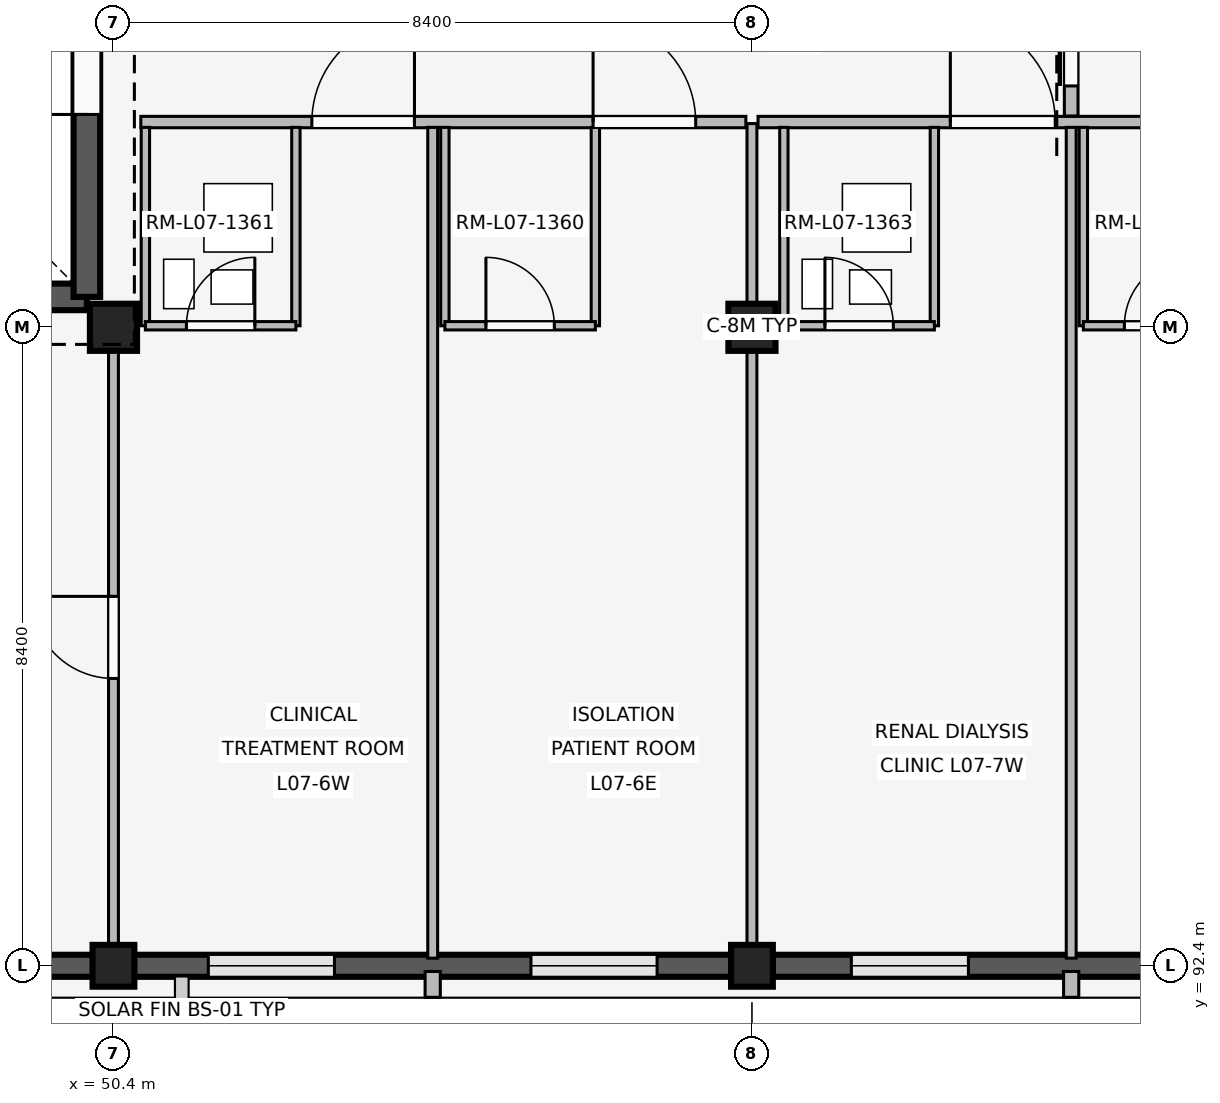
"""IFC4 building model, lengths in metres.
Left out: names, types, materials, properties, quantities, classifications, styles, units other than length and angle.
Written with IfcOpenShell. Run it as: python <this file> out.ifc"""

import sys

from ifc_helpers import new_model, si_unit, direction, frame, frame_2d, origin, origin_2d, place, context, subcontext, project, spatial, rectangle, extrude, element, fill, save


model = new_model("IFC4")
c1 = context("Model", 3, precision=1e-05, world=origin(), true_north=direction((0.0, 1.0)))
c2 = subcontext(c1, "Body", "Model", "MODEL_VIEW")
j1 = project(units=[si_unit("LENGTHUNIT", "METRE"), si_unit("PLANEANGLEUNIT", "RADIAN")], contexts=[c1])
p1 = place(None, origin())
s1 = spatial("IfcSite", under=j1, at=p1, CompositionType="ELEMENT")
p2 = place(p1, origin())
s2 = spatial("IfcBuilding", under=s1, at=p2, CompositionType="ELEMENT")
p3 = place(p2, frame((0.0, 0.0, 28.8)))
s3 = spatial("IfcBuildingStorey", under=s2, at=p3, CompositionType="ELEMENT", Elevation=28.8)
p4 = place(p3, frame((50.4, 92.4, 0.0), z_axis=(0.0, 0.0, 1.0), x_axis=(1.0, 0.0, 0.0)))
e1 = element("IfcColumn", 1, at=p4, inside=s3, PredefinedType="COLUMN", context=c2, shape_type="SweptSolid", body=[
    extrude(rectangle(XDim=0.55, YDim=0.55, at=origin_2d()), origin(), (0.0, 0.0, 1.0), 4.2),
])
p5 = place(p3, frame((50.4, 100.8, 0.0), z_axis=(0.0, 0.0, 1.0), x_axis=(1.0, 0.0, 0.0)))
e2 = element("IfcColumn", 2, at=p5, inside=s3, PredefinedType="COLUMN", context=c2, shape_type="SweptSolid", body=[
    extrude(rectangle(XDim=0.62, YDim=0.62, at=origin_2d()), origin(), (0.0, 0.0, 1.0), 4.2),
])
p6 = place(p3, frame((58.8, 92.4, 0.0), z_axis=(0.0, 0.0, 1.0), x_axis=(1.0, 0.0, 0.0)))
e3 = element("IfcColumn", 3, at=p6, inside=s3, PredefinedType="COLUMN", context=c2, shape_type="SweptSolid", body=[
    extrude(rectangle(XDim=0.55, YDim=0.55, at=origin_2d()), origin(), (0.0, 0.0, 1.0), 4.2),
])
p7 = place(p3, frame((58.8, 100.8, 0.0), z_axis=(0.0, 0.0, 1.0), x_axis=(1.0, 0.0, 0.0)))
e4 = element("IfcColumn", 4, at=p7, inside=s3, PredefinedType="COLUMN", context=c2, shape_type="SweptSolid", body=[
    extrude(rectangle(XDim=0.62, YDim=0.62, at=origin_2d()), origin(), (0.0, 0.0, 1.0), 4.2),
])
p8 = place(p3, frame((50.13, 92.4, 0.0), z_axis=(0.0, 0.0, 1.0), x_axis=(-1.0, 0.0, 0.0)))
e5 = element("IfcWall", 5, at=p8, inside=s3, PredefinedType="SOLIDWALL", context=c2, shape_type="SweptSolid", body=[
    extrude(rectangle(XDim=7.86, YDim=0.29, at=frame_2d((3.93, 0.0))), origin(), (0.0, 0.0, 1.0), 3.34),
])
p9 = place(p8, frame((1.098, 0.0, 0.85)))
e6 = element("IfcOpeningElement", 6, at=p9, cuts=e5, PredefinedType="OPENING", context=c2, shape_type="SweptSolid", body=[
    extrude(rectangle(XDim=1.42, YDim=1.45, at=frame_2d((0.71, 0.725))), frame((0.0, 0.155, 0.0), z_axis=(0.0, -1.0, 0.0), x_axis=(1.0, 0.0, 0.0)), (0.0, 0.0, 1.0), 0.31),
])
p10 = place(p8, frame((5.342, 0.0, 0.85)))
e7 = element("IfcOpeningElement", 7, at=p10, cuts=e5, PredefinedType="OPENING", context=c2, shape_type="SweptSolid", body=[
    extrude(rectangle(XDim=1.42, YDim=1.45, at=frame_2d((0.71, 0.725))), frame((0.0, 0.155, 0.0), z_axis=(0.0, -1.0, 0.0), x_axis=(1.0, 0.0, 0.0)), (0.0, 0.0, 1.0), 0.31),
])
p11 = place(p3, frame((58.53, 92.4, 0.0), z_axis=(0.0, 0.0, 1.0), x_axis=(-1.0, 0.0, 0.0)))
e8 = element("IfcWall", 8, at=p11, inside=s3, PredefinedType="SOLIDWALL", context=c2, shape_type="SweptSolid", body=[
    extrude(rectangle(XDim=7.86, YDim=0.29, at=frame_2d((3.93, 0.0))), origin(), (0.0, 0.0, 1.0), 3.34),
])
p12 = place(p11, frame((0.978, 0.0, 0.85)))
e9 = element("IfcOpeningElement", 9, at=p12, cuts=e8, PredefinedType="OPENING", context=c2, shape_type="SweptSolid", body=[
    extrude(rectangle(XDim=1.66, YDim=1.95, at=frame_2d((0.83, 0.975))), frame((0.0, 0.155, 0.0), z_axis=(0.0, -1.0, 0.0), x_axis=(1.0, 0.0, 0.0)), (0.0, 0.0, 1.0), 0.31),
])
p13 = place(p11, frame((5.222, 0.0, 0.85)))
e10 = element("IfcOpeningElement", 10, at=p13, cuts=e8, PredefinedType="OPENING", context=c2, shape_type="SweptSolid", body=[
    extrude(rectangle(XDim=1.66, YDim=1.95, at=frame_2d((0.83, 0.975))), frame((0.0, 0.155, 0.0), z_axis=(0.0, -1.0, 0.0), x_axis=(1.0, 0.0, 0.0)), (0.0, 0.0, 1.0), 0.31),
])
p14 = place(p3, frame((54.6, 92.325, 0.0), z_axis=(0.0, 0.0, 1.0), x_axis=(0.0, -1.0, 0.0)))
e11 = element("IfcWall", 11, at=p14, inside=s3, PredefinedType="ELEMENTEDWALL", context=c2, shape_type="SweptSolid", body=[
    extrude(rectangle(XDim=0.34, YDim=0.2, at=frame_2d((0.17, 0.0))), origin(), (0.0, 0.0, 1.0), 3.32),
])
p15 = place(p3, frame((66.93, 92.4, 0.0), z_axis=(0.0, 0.0, 1.0), x_axis=(-1.0, 0.0, 0.0)))
e12 = element("IfcWall", 12, at=p15, inside=s3, PredefinedType="SOLIDWALL", context=c2, shape_type="SweptSolid", body=[
    extrude(rectangle(XDim=7.86, YDim=0.29, at=frame_2d((3.93, 0.0))), origin(), (0.0, 0.0, 1.0), 3.34),
])
p16 = place(p15, frame((1.038, 0.0, 0.85)))
e13 = element("IfcOpeningElement", 13, at=p16, cuts=e12, PredefinedType="OPENING", context=c2, shape_type="SweptSolid", body=[
    extrude(rectangle(XDim=1.54, YDim=1.85, at=frame_2d((0.77, 0.925))), frame((0.0, 0.155, 0.0), z_axis=(0.0, -1.0, 0.0), x_axis=(1.0, 0.0, 0.0)), (0.0, 0.0, 1.0), 0.31),
])
p17 = place(p15, frame((5.282, 0.0, 0.85)))
e14 = element("IfcOpeningElement", 14, at=p17, cuts=e12, PredefinedType="OPENING", context=c2, shape_type="SweptSolid", body=[
    extrude(rectangle(XDim=1.54, YDim=1.85, at=frame_2d((0.77, 0.925))), frame((0.0, 0.155, 0.0), z_axis=(0.0, -1.0, 0.0), x_axis=(1.0, 0.0, 0.0)), (0.0, 0.0, 1.0), 0.31),
])
p18 = place(p3, frame((63.0, 92.325, 0.0), z_axis=(0.0, 0.0, 1.0), x_axis=(0.0, -1.0, 0.0)))
e15 = element("IfcWall", 15, at=p18, inside=s3, PredefinedType="ELEMENTEDWALL", context=c2, shape_type="SweptSolid", body=[
    extrude(rectangle(XDim=0.34, YDim=0.2, at=frame_2d((0.17, 0.0))), origin(), (0.0, 0.0, 1.0), 3.32),
])
p19 = place(p3, frame((42.55, 101.2, 0.0), z_axis=(0.0, 0.0, 1.0), x_axis=(1.0, 0.0, 0.0)))
e16 = element("IfcWall", 16, at=p19, inside=s3, PredefinedType="SHEAR", context=c2, shape_type="SweptSolid", body=[
    extrude(rectangle(XDim=7.5, YDim=0.35, at=frame_2d((3.75, 0.0))), origin(), (0.0, 0.0, 1.0), 3.94),
])
p20 = place(p19, frame((4.85, 0.0, 0.0)))
e17 = element("IfcOpeningElement", 17, at=p20, cuts=e16, PredefinedType="OPENING", context=c2, shape_type="SweptSolid", body=[
    extrude(rectangle(XDim=1.2, YDim=2.2, at=frame_2d((0.6, 1.1))), frame((0.0, 0.185, 0.0), z_axis=(0.0, -1.0, 0.0), x_axis=(1.0, 0.0, 0.0)), (0.0, 0.0, 1.0), 0.37),
])
p21 = place(p3, frame((50.05, 101.2, 0.0), z_axis=(0.0, 0.0, 1.0), x_axis=(0.0, 1.0, 0.0)))
e18 = element("IfcWall", 18, at=p21, inside=s3, PredefinedType="SHEAR", context=c2, shape_type="SweptSolid", body=[
    extrude(rectangle(XDim=7.55, YDim=0.35, at=frame_2d((3.775, 0.0))), origin(), (0.0, 0.0, 1.0), 3.94),
])
p22 = place(p21, frame((2.4, 0.0, 0.0)))
e19 = element("IfcOpeningElement", 19, at=p22, cuts=e18, PredefinedType="OPENING", context=c2, shape_type="SweptSolid", body=[
    extrude(rectangle(XDim=1.2, YDim=2.2, at=frame_2d((0.6, 1.1))), frame((0.0, 0.185, 0.0), z_axis=(0.0, -1.0, 0.0), x_axis=(1.0, 0.0, 0.0)), (0.0, 0.0, 1.0), 0.37),
])
p23 = place(p3, frame((50.4, 92.54, 0.0), z_axis=(0.0, 0.0, 1.0), x_axis=(0.0, 1.0, 0.0)))
e20 = element("IfcWall", 20, at=p23, inside=s3, PredefinedType="PARTITIONING", context=c2, shape_type="SweptSolid", body=[
    extrude(rectangle(XDim=8.21, YDim=0.13, at=frame_2d((4.105, 0.0))), origin(), (0.0, 0.0, 1.0), 3.32),
])
p24 = place(p23, frame((3.64, 0.0, 0.0)))
e21 = element("IfcOpeningElement", 21, at=p24, cuts=e20, PredefinedType="OPENING", context=c2, shape_type="SweptSolid", body=[
    extrude(rectangle(XDim=1.08, YDim=2.15, at=frame_2d((0.54, 1.075))), frame((0.0, 0.075, 0.0), z_axis=(0.0, -1.0, 0.0), x_axis=(1.0, 0.0, 0.0)), (0.0, 0.0, 1.0), 0.15),
])
p25 = place(p3, frame((50.76, 103.5, 0.0), z_axis=(0.0, 0.0, 1.0), x_axis=(1.0, 0.0, 0.0)))
e22 = element("IfcWall", 22, at=p25, inside=s3, PredefinedType="PARTITIONING", context=c2, shape_type="SweptSolid", body=[
    extrude(rectangle(XDim=7.96, YDim=0.15, at=frame_2d((3.98, 0.0))), origin(), (0.0, 0.0, 1.0), 3.32),
])
p26 = place(p25, frame((2.25, 0.0, 0.0)))
e23 = element("IfcOpeningElement", 23, at=p26, cuts=e22, PredefinedType="OPENING", context=c2, shape_type="SweptSolid", body=[
    extrude(rectangle(XDim=1.35, YDim=2.25, at=frame_2d((0.675, 1.125))), frame((0.0, 0.085, 0.0), z_axis=(0.0, -1.0, 0.0), x_axis=(1.0, 0.0, 0.0)), (0.0, 0.0, 1.0), 0.17),
])
p27 = place(p25, frame((5.95, 0.0, 0.0)))
e24 = element("IfcOpeningElement", 24, at=p27, cuts=e22, PredefinedType="OPENING", context=c2, shape_type="SweptSolid", body=[
    extrude(rectangle(XDim=1.35, YDim=2.25, at=frame_2d((0.675, 1.125))), frame((0.0, 0.085, 0.0), z_axis=(0.0, -1.0, 0.0), x_axis=(1.0, 0.0, 0.0)), (0.0, 0.0, 1.0), 0.17),
])
p28 = place(p3, frame((54.6, 92.5, 0.0), z_axis=(0.0, 0.0, 1.0), x_axis=(0.0, 1.0, 0.0)))
e25 = element("IfcWall", 25, at=p28, inside=s3, PredefinedType="PARTITIONING", context=c2, shape_type="SweptSolid", body=[
    extrude(rectangle(XDim=10.93, YDim=0.13, at=frame_2d((5.465, 0.0))), origin(), (0.0, 0.0, 1.0), 3.32),
])
for number, where, z_axis, x_axis in (
    (26, (50.82, 100.82, 0.0), (0.0, 0.0, 1.0), (0.0, 1.0, 0.0)),
    (27, (52.8, 100.82, 0.0), (0.0, 0.0, 1.0), (0.0, 1.0, 0.0)),
):
    element("IfcWall", number, at=place(p3, frame(where, z_axis=z_axis, x_axis=x_axis)), inside=s3, PredefinedType="PARTITIONING", context=c2, shape_type="SweptSolid", body=[
        extrude(rectangle(XDim=2.61, YDim=0.11, at=frame_2d((1.305, 0.0))), origin(), (0.0, 0.0, 1.0), 3.32),
    ])
p29 = place(p3, frame((50.82, 100.82, 0.0), z_axis=(0.0, 0.0, 1.0), x_axis=(1.0, 0.0, 0.0)))
e28 = element("IfcWall", 28, at=p29, inside=s3, PredefinedType="PARTITIONING", context=c2, shape_type="SweptSolid", body=[
    extrude(rectangle(XDim=1.98, YDim=0.11, at=frame_2d((0.99, 0.0))), origin(), (0.0, 0.0, 1.0), 3.32),
])
p30 = place(p29, frame((0.54, 0.0, 0.0)))
e29 = element("IfcOpeningElement", 29, at=p30, cuts=e28, PredefinedType="OPENING", context=c2, shape_type="SweptSolid", body=[
    extrude(rectangle(XDim=0.9, YDim=2.1, at=frame_2d((0.45, 1.05))), frame((0.0, 0.065, 0.0), z_axis=(0.0, -1.0, 0.0), x_axis=(1.0, 0.0, 0.0)), (0.0, 0.0, 1.0), 0.13),
])
for number, where, z_axis, x_axis in (
    (30, (54.76, 100.82, 0.0), (0.0, 0.0, 1.0), (0.0, 1.0, 0.0)),
    (31, (56.74, 100.82, 0.0), (0.0, 0.0, 1.0), (0.0, 1.0, 0.0)),
):
    element("IfcWall", number, at=place(p3, frame(where, z_axis=z_axis, x_axis=x_axis)), inside=s3, PredefinedType="PARTITIONING", context=c2, shape_type="SweptSolid", body=[
        extrude(rectangle(XDim=2.61, YDim=0.11, at=frame_2d((1.305, 0.0))), origin(), (0.0, 0.0, 1.0), 3.32),
    ])
p31 = place(p3, frame((54.76, 100.82, 0.0), z_axis=(0.0, 0.0, 1.0), x_axis=(1.0, 0.0, 0.0)))
e32 = element("IfcWall", 32, at=p31, inside=s3, PredefinedType="PARTITIONING", context=c2, shape_type="SweptSolid", body=[
    extrude(rectangle(XDim=1.98, YDim=0.11, at=frame_2d((0.99, 0.0))), origin(), (0.0, 0.0, 1.0), 3.32),
])
p32 = place(p31, frame((0.54, 0.0, 0.0)))
e33 = element("IfcOpeningElement", 33, at=p32, cuts=e32, PredefinedType="OPENING", context=c2, shape_type="SweptSolid", body=[
    extrude(rectangle(XDim=0.9, YDim=2.1, at=frame_2d((0.45, 1.05))), frame((0.0, 0.065, 0.0), z_axis=(0.0, -1.0, 0.0), x_axis=(1.0, 0.0, 0.0)), (0.0, 0.0, 1.0), 0.13),
])
p33 = place(p3, frame((58.8, 92.54, 0.0), z_axis=(0.0, 0.0, 1.0), x_axis=(0.0, 1.0, 0.0)))
e34 = element("IfcWall", 34, at=p33, inside=s3, PredefinedType="PARTITIONING", context=c2, shape_type="SweptSolid", body=[
    extrude(rectangle(XDim=10.94, YDim=0.13, at=frame_2d((5.47, 0.0))), origin(), (0.0, 0.0, 1.0), 3.32),
])
p34 = place(p3, frame((58.88, 103.5, 0.0), z_axis=(0.0, 0.0, 1.0), x_axis=(1.0, 0.0, 0.0)))
e35 = element("IfcWall", 35, at=p34, inside=s3, PredefinedType="PARTITIONING", context=c2, shape_type="SweptSolid", body=[
    extrude(rectangle(XDim=8.24, YDim=0.15, at=frame_2d((4.12, 0.0))), origin(), (0.0, 0.0, 1.0), 3.32),
])
p35 = place(p34, frame((2.53, 0.0, 0.0)))
e36 = element("IfcOpeningElement", 36, at=p35, cuts=e35, PredefinedType="OPENING", context=c2, shape_type="SweptSolid", body=[
    extrude(rectangle(XDim=1.38, YDim=2.25, at=frame_2d((0.69, 1.125))), frame((0.0, 0.085, 0.0), z_axis=(0.0, -1.0, 0.0), x_axis=(1.0, 0.0, 0.0)), (0.0, 0.0, 1.0), 0.17),
])
p36 = place(p34, frame((6.23, 0.0, 0.0)))
e37 = element("IfcOpeningElement", 37, at=p36, cuts=e35, PredefinedType="OPENING", context=c2, shape_type="SweptSolid", body=[
    extrude(rectangle(XDim=1.38, YDim=2.25, at=frame_2d((0.69, 1.125))), frame((0.0, 0.085, 0.0), z_axis=(0.0, -1.0, 0.0), x_axis=(1.0, 0.0, 0.0)), (0.0, 0.0, 1.0), 0.17),
])
p37 = place(p3, frame((63.0, 92.5, 0.0), z_axis=(0.0, 0.0, 1.0), x_axis=(0.0, 1.0, 0.0)))
e38 = element("IfcWall", 38, at=p37, inside=s3, PredefinedType="PARTITIONING", context=c2, shape_type="SweptSolid", body=[
    extrude(rectangle(XDim=10.93, YDim=0.13, at=frame_2d((5.465, 0.0))), origin(), (0.0, 0.0, 1.0), 3.32),
])
for number, where, z_axis, x_axis in (
    (39, (59.22, 100.82, 0.0), (0.0, 0.0, 1.0), (0.0, 1.0, 0.0)),
    (40, (61.2, 100.82, 0.0), (0.0, 0.0, 1.0), (0.0, 1.0, 0.0)),
):
    element("IfcWall", number, at=place(p3, frame(where, z_axis=z_axis, x_axis=x_axis)), inside=s3, PredefinedType="PARTITIONING", context=c2, shape_type="SweptSolid", body=[
        extrude(rectangle(XDim=2.61, YDim=0.11, at=frame_2d((1.305, 0.0))), origin(), (0.0, 0.0, 1.0), 3.32),
    ])
p38 = place(p3, frame((59.22, 100.82, 0.0), z_axis=(0.0, 0.0, 1.0), x_axis=(1.0, 0.0, 0.0)))
e41 = element("IfcWall", 41, at=p38, inside=s3, PredefinedType="PARTITIONING", context=c2, shape_type="SweptSolid", body=[
    extrude(rectangle(XDim=1.98, YDim=0.11, at=frame_2d((0.99, 0.0))), origin(), (0.0, 0.0, 1.0), 3.32),
])
p39 = place(p38, frame((0.54, 0.0, 0.0)))
e42 = element("IfcOpeningElement", 42, at=p39, cuts=e41, PredefinedType="OPENING", context=c2, shape_type="SweptSolid", body=[
    extrude(rectangle(XDim=0.9, YDim=2.1, at=frame_2d((0.45, 1.05))), frame((0.0, 0.065, 0.0), z_axis=(0.0, -1.0, 0.0), x_axis=(1.0, 0.0, 0.0)), (0.0, 0.0, 1.0), 0.13),
])
p40 = place(p3, frame((63.16, 100.82, 0.0), z_axis=(0.0, 0.0, 1.0), x_axis=(0.0, 1.0, 0.0)))
e43 = element("IfcWall", 43, at=p40, inside=s3, PredefinedType="PARTITIONING", context=c2, shape_type="SweptSolid", body=[
    extrude(rectangle(XDim=2.61, YDim=0.11, at=frame_2d((1.305, 0.0))), origin(), (0.0, 0.0, 1.0), 3.32),
])
p41 = place(p3, frame((63.16, 100.82, 0.0), z_axis=(0.0, 0.0, 1.0), x_axis=(1.0, 0.0, 0.0)))
e44 = element("IfcWall", 44, at=p41, inside=s3, PredefinedType="PARTITIONING", context=c2, shape_type="SweptSolid", body=[
    extrude(rectangle(XDim=1.98, YDim=0.11, at=frame_2d((0.99, 0.0))), origin(), (0.0, 0.0, 1.0), 3.32),
])
p42 = place(p41, frame((0.54, 0.0, 0.0)))
e45 = element("IfcOpeningElement", 45, at=p42, cuts=e44, PredefinedType="OPENING", context=c2, shape_type="SweptSolid", body=[
    extrude(rectangle(XDim=0.9, YDim=2.1, at=frame_2d((0.45, 1.05))), frame((0.0, 0.065, 0.0), z_axis=(0.0, -1.0, 0.0), x_axis=(1.0, 0.0, 0.0)), (0.0, 0.0, 1.0), 0.13),
])
p43 = place(p3, frame((63.0, 103.58, 0.0), z_axis=(0.0, 0.0, 1.0), x_axis=(0.0, 1.0, 0.0)))
e46 = element("IfcWall", 46, at=p43, inside=s3, PredefinedType="PARTITIONING", context=c2, shape_type="SweptSolid", body=[
    extrude(rectangle(XDim=2.84, YDim=0.18, at=frame_2d((1.42, 0.0))), origin(), (0.0, 0.0, 1.0), 3.32),
])
p44 = place(p43, frame((0.395, 0.0, 0.0)))
e47 = element("IfcOpeningElement", 47, at=p44, cuts=e46, PredefinedType="OPENING", context=c2, shape_type="SweptSolid", body=[
    extrude(rectangle(XDim=2.05, YDim=2.35, at=frame_2d((1.025, 1.175))), frame((0.0, 0.1, 0.0), z_axis=(0.0, -1.0, 0.0), x_axis=(1.0, 0.0, 0.0)), (0.0, 0.0, 1.0), 0.2),
])
p45 = place(p12, origin())
e48 = element("IfcWindow", 48, at=p45, inside=s3, PartitioningType="SINGLE_PANEL", PredefinedType="WINDOW", context=c2, shape_type="SweptSolid", body=[
    extrude(rectangle(XDim=1.66, YDim=1.95, at=frame_2d((0.83, 0.975))), frame((0.0, 0.03, 0.0), z_axis=(0.0, -1.0, 0.0), x_axis=(1.0, 0.0, 0.0)), (0.0, 0.0, 1.0), 0.06),
])
fill(e9, e48)
p46 = place(p13, origin())
e49 = element("IfcWindow", 49, at=p46, inside=s3, PartitioningType="SINGLE_PANEL", PredefinedType="WINDOW", context=c2, shape_type="SweptSolid", body=[
    extrude(rectangle(XDim=1.66, YDim=1.95, at=frame_2d((0.83, 0.975))), frame((0.0, 0.03, 0.0), z_axis=(0.0, -1.0, 0.0), x_axis=(1.0, 0.0, 0.0)), (0.0, 0.0, 1.0), 0.06),
])
fill(e10, e49)
p47 = place(p17, origin())
e50 = element("IfcWindow", 50, at=p47, inside=s3, PartitioningType="SINGLE_PANEL", PredefinedType="WINDOW", context=c2, shape_type="SweptSolid", body=[
    extrude(rectangle(XDim=1.54, YDim=1.85, at=frame_2d((0.77, 0.925))), frame((0.0, 0.03, 0.0), z_axis=(0.0, -1.0, 0.0), x_axis=(1.0, 0.0, 0.0)), (0.0, 0.0, 1.0), 0.06),
])
fill(e14, e50)
p48 = place(p22, origin())
e51 = element("IfcDoor", 51, at=p48, inside=s3, OperationType="SINGLE_SWING_LEFT", PredefinedType="DOOR", context=c2, shape_type="SweptSolid", body=[
    extrude(rectangle(XDim=1.2, YDim=2.2, at=frame_2d((0.6, 1.1))), frame((0.0, 0.025, 0.0), z_axis=(0.0, -1.0, 0.0), x_axis=(1.0, 0.0, 0.0)), (0.0, 0.0, 1.0), 0.05),
])
fill(e19, e51)
p49 = place(p24, origin())
e52 = element("IfcDoor", 52, at=p49, inside=s3, OperationType="SINGLE_SWING_RIGHT", PredefinedType="DOOR", context=c2, shape_type="SweptSolid", body=[
    extrude(rectangle(XDim=1.08, YDim=2.15, at=frame_2d((0.54, 1.075))), frame((0.0, 0.025, 0.0), z_axis=(0.0, -1.0, 0.0), x_axis=(1.0, 0.0, 0.0)), (0.0, 0.0, 1.0), 0.05),
])
fill(e21, e52)
p50 = place(p26, origin())
e53 = element("IfcDoor", 53, at=p50, inside=s3, OperationType="SINGLE_SWING_RIGHT", PredefinedType="DOOR", context=c2, shape_type="SweptSolid", body=[
    extrude(rectangle(XDim=1.35, YDim=2.25, at=frame_2d((0.675, 1.125))), frame((0.0, 0.025, 0.0), z_axis=(0.0, -1.0, 0.0), x_axis=(1.0, 0.0, 0.0)), (0.0, 0.0, 1.0), 0.05),
])
fill(e23, e53)
p51 = place(p27, origin())
e54 = element("IfcDoor", 54, at=p51, inside=s3, OperationType="SINGLE_SWING_LEFT", PredefinedType="DOOR", context=c2, shape_type="SweptSolid", body=[
    extrude(rectangle(XDim=1.35, YDim=2.25, at=frame_2d((0.675, 1.125))), frame((0.0, 0.025, 0.0), z_axis=(0.0, -1.0, 0.0), x_axis=(1.0, 0.0, 0.0)), (0.0, 0.0, 1.0), 0.05),
])
fill(e24, e54)
p52 = place(p30, origin())
e55 = element("IfcDoor", 55, at=p52, inside=s3, OperationType="SINGLE_SWING_RIGHT", PredefinedType="DOOR", context=c2, shape_type="SweptSolid", body=[
    extrude(rectangle(XDim=0.9, YDim=2.1, at=frame_2d((0.45, 1.05))), frame((0.0, 0.025, 0.0), z_axis=(0.0, -1.0, 0.0), x_axis=(1.0, 0.0, 0.0)), (0.0, 0.0, 1.0), 0.05),
])
fill(e29, e55)
p53 = place(p32, origin())
e56 = element("IfcDoor", 56, at=p53, inside=s3, OperationType="SINGLE_SWING_LEFT", PredefinedType="DOOR", context=c2, shape_type="SweptSolid", body=[
    extrude(rectangle(XDim=0.9, YDim=2.1, at=frame_2d((0.45, 1.05))), frame((0.0, 0.025, 0.0), z_axis=(0.0, -1.0, 0.0), x_axis=(1.0, 0.0, 0.0)), (0.0, 0.0, 1.0), 0.05),
])
fill(e33, e56)
p54 = place(p35, origin())
e57 = element("IfcDoor", 57, at=p54, inside=s3, OperationType="SINGLE_SWING_LEFT", PredefinedType="DOOR", context=c2, shape_type="SweptSolid", body=[
    extrude(rectangle(XDim=1.38, YDim=2.25, at=frame_2d((0.69, 1.125))), frame((0.0, 0.025, 0.0), z_axis=(0.0, -1.0, 0.0), x_axis=(1.0, 0.0, 0.0)), (0.0, 0.0, 1.0), 0.05),
])
fill(e36, e57)
p55 = place(p39, origin())
e58 = element("IfcDoor", 58, at=p55, inside=s3, OperationType="SINGLE_SWING_LEFT", PredefinedType="DOOR", context=c2, shape_type="SweptSolid", body=[
    extrude(rectangle(XDim=0.9, YDim=2.1, at=frame_2d((0.45, 1.05))), frame((0.0, 0.025, 0.0), z_axis=(0.0, -1.0, 0.0), x_axis=(1.0, 0.0, 0.0)), (0.0, 0.0, 1.0), 0.05),
])
fill(e42, e58)
p56 = place(p42, origin())
e59 = element("IfcDoor", 59, at=p56, inside=s3, OperationType="SINGLE_SWING_RIGHT", PredefinedType="DOOR", context=c2, shape_type="SweptSolid", body=[
    extrude(rectangle(XDim=0.9, YDim=2.1, at=frame_2d((0.45, 1.05))), frame((0.0, 0.025, 0.0), z_axis=(0.0, -1.0, 0.0), x_axis=(1.0, 0.0, 0.0)), (0.0, 0.0, 1.0), 0.05),
])
fill(e45, e59)
p57 = place(p44, origin())
e60 = element("IfcDoor", 60, at=p57, inside=s3, OperationType="SLIDING_TO_LEFT", PredefinedType="DOOR", context=c2, shape_type="SweptSolid", body=[
    extrude(rectangle(XDim=2.05, YDim=2.35, at=frame_2d((1.025, 1.175))), frame((0.0, 0.025, 0.0), z_axis=(0.0, -1.0, 0.0), x_axis=(1.0, 0.0, 0.0)), (0.0, 0.0, 1.0), 0.05),
])
fill(e47, e60)
save(model, sys.argv[1])
